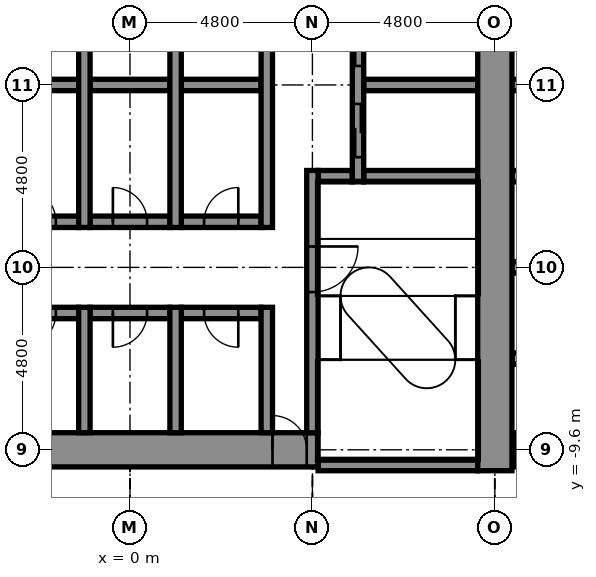
"""IFC4 building model, lengths in metres.
Left out: names, types, materials, properties, quantities, classifications, styles, units other than length and angle.
Written with IfcOpenShell. Run it as: python <this file> out.ifc"""

import sys

from ifc_helpers import new_model, si_unit, direction, frame, frame_2d, origin, place, context, subcontext, project, spatial, rectangle, extrude, element, fill, save


model = new_model("IFC4")
c1 = context("Model", 3, precision=1e-05, world=origin(), true_north=direction((0.0, 1.0)))
c2 = subcontext(c1, "Body", "Model", "MODEL_VIEW")
j1 = project(units=[si_unit("LENGTHUNIT", "METRE"), si_unit("PLANEANGLEUNIT", "RADIAN")], contexts=[c1])
p1 = place(None, origin())
s1 = spatial("IfcSite", under=j1, at=p1, CompositionType="ELEMENT")
p2 = place(p1, origin())
s2 = spatial("IfcBuilding", under=s1, at=p2, CompositionType="ELEMENT")
p3 = place(p2, frame((0.0, 0.0, 122.9)))
s3 = spatial("IfcBuildingStorey", under=s2, at=p3, CompositionType="ELEMENT", Elevation=122.9)
p4 = place(p3, frame((4.95, -10.0, -0.2), z_axis=(0.0, 0.0, 1.0), x_axis=(1.0, 0.0, 0.0)))
e1 = element("IfcWall", 1, at=p4, inside=s3, PredefinedType="STANDARD", context=c2, shape_type="SweptSolid", body=[
    extrude(rectangle(XDim=4.2, YDim=0.3, at=frame_2d((2.1, 0.0))), origin(), (0.0, 0.0, 1.0), 4.4),
])
p5 = place(p3, frame((-5.25, -9.6, -0.2), z_axis=(0.0, 0.0, 1.0), x_axis=(1.0, 0.0, 0.0)))
e2 = element("IfcWall", 2, at=p5, inside=s3, PredefinedType="SHEAR", context=c2, shape_type="SweptSolid", body=[
    extrude(rectangle(XDim=10.2, YDim=0.9, at=frame_2d((5.1, 0.0))), origin(), (0.0, 0.0, 1.0), 4.4),
])
p6 = place(p5, frame((9.0, 0.0, 0.2)))
e3 = element("IfcOpeningElement", 3, at=p6, cuts=e2, PredefinedType="OPENING", context=c2, shape_type="SweptSolid", body=[
    extrude(rectangle(XDim=0.9, YDim=2.1, at=frame_2d((0.45, 1.05))), frame((0.0, 0.46, 0.0), z_axis=(0.0, -1.0, 0.0), x_axis=(1.0, 0.0, 0.0)), (0.0, 0.0, 1.0), 0.92),
])
p7 = place(p3, frame((10.05, -9.6, -0.2), z_axis=(0.0, 0.0, 1.0), x_axis=(1.0, 0.0, 0.0)))
e4 = element("IfcWall", 4, at=p7, inside=s3, PredefinedType="SHEAR", context=c2, shape_type="SweptSolid", body=[
    extrude(rectangle(XDim=3.9, YDim=0.9, at=frame_2d((1.95, 0.0))), origin(), (0.0, 0.0, 1.0), 4.4),
])
p8 = place(p7, frame((0.1, 0.0, 0.2)))
e5 = element("IfcOpeningElement", 5, at=p8, cuts=e4, PredefinedType="OPENING", context=c2, shape_type="SweptSolid", body=[
    extrude(rectangle(XDim=0.9, YDim=2.1, at=frame_2d((0.45, 1.05))), frame((0.0, 0.46, 0.0), z_axis=(0.0, -1.0, 0.0), x_axis=(1.0, 0.0, 0.0)), (0.0, 0.0, 1.0), 0.92),
])
p9 = place(p7, frame((2.5, 0.0, 0.2)))
e6 = element("IfcOpeningElement", 6, at=p9, cuts=e4, PredefinedType="OPENING", context=c2, shape_type="SweptSolid", body=[
    extrude(rectangle(XDim=0.9, YDim=2.1, at=frame_2d((0.45, 1.05))), frame((0.0, 0.46, 0.0), z_axis=(0.0, -1.0, 0.0), x_axis=(1.0, 0.0, 0.0)), (0.0, 0.0, 1.0), 0.92),
])
p10 = place(p3, frame((10.05, -7.2, -0.2), z_axis=(0.0, 0.0, 1.0), x_axis=(1.0, 0.0, 0.0)))
e7 = element("IfcWall", 7, at=p10, inside=s3, PredefinedType="STANDARD", context=c2, shape_type="SweptSolid", body=[
    extrude(rectangle(XDim=3.9, YDim=0.3, at=frame_2d((1.95, 0.0))), origin(), (0.0, 0.0, 1.0), 4.4),
])
p11 = place(p3, frame((-3.45, -6.0, -0.2), z_axis=(0.0, 0.0, 1.0), x_axis=(1.0, 0.0, 0.0)))
e8 = element("IfcWall", 8, at=p11, inside=s3, PredefinedType="STANDARD", context=c2, shape_type="SweptSolid", body=[
    extrude(rectangle(XDim=2.1, YDim=0.3, at=frame_2d((1.05, 0.0))), origin(), (0.0, 0.0, 1.0), 4.4),
])
p12 = place(p11, frame((0.6, 0.0, 0.2)))
e9 = element("IfcOpeningElement", 9, at=p12, cuts=e8, PredefinedType="OPENING", context=c2, shape_type="SweptSolid", body=[
    extrude(rectangle(XDim=0.9, YDim=2.1, at=frame_2d((0.45, 1.05))), frame((0.0, 0.16, 0.0), z_axis=(0.0, -1.0, 0.0), x_axis=(1.0, 0.0, 0.0)), (0.0, 0.0, 1.0), 0.32),
])
p13 = place(p3, frame((-1.05, -6.0, -0.2), z_axis=(0.0, 0.0, 1.0), x_axis=(1.0, 0.0, 0.0)))
e10 = element("IfcWall", 10, at=p13, inside=s3, PredefinedType="STANDARD", context=c2, shape_type="SweptSolid", body=[
    extrude(rectangle(XDim=2.1, YDim=0.3, at=frame_2d((1.05, 0.0))), origin(), (0.0, 0.0, 1.0), 4.4),
])
p14 = place(p13, frame((0.6, 0.0, 0.2)))
e11 = element("IfcOpeningElement", 11, at=p14, cuts=e10, PredefinedType="OPENING", context=c2, shape_type="SweptSolid", body=[
    extrude(rectangle(XDim=0.9, YDim=2.1, at=frame_2d((0.45, 1.05))), frame((0.0, 0.16, 0.0), z_axis=(0.0, -1.0, 0.0), x_axis=(1.0, 0.0, 0.0)), (0.0, 0.0, 1.0), 0.32),
])
p15 = place(p3, frame((1.35, -6.0, -0.2), z_axis=(0.0, 0.0, 1.0), x_axis=(1.0, 0.0, 0.0)))
e12 = element("IfcWall", 12, at=p15, inside=s3, PredefinedType="STANDARD", context=c2, shape_type="SweptSolid", body=[
    extrude(rectangle(XDim=2.1, YDim=0.3, at=frame_2d((1.05, 0.0))), origin(), (0.0, 0.0, 1.0), 4.4),
])
p16 = place(p15, frame((0.6, 0.0, 0.2)))
e13 = element("IfcOpeningElement", 13, at=p16, cuts=e12, PredefinedType="OPENING", context=c2, shape_type="SweptSolid", body=[
    extrude(rectangle(XDim=0.9, YDim=2.1, at=frame_2d((0.45, 1.05))), frame((0.0, 0.16, 0.0), z_axis=(0.0, -1.0, 0.0), x_axis=(1.0, 0.0, 0.0)), (0.0, 0.0, 1.0), 0.32),
])
p17 = place(p3, frame((10.05, -4.8, -0.2), z_axis=(0.0, 0.0, 1.0), x_axis=(1.0, 0.0, 0.0)))
e14 = element("IfcWall", 14, at=p17, inside=s3, PredefinedType="STANDARD", context=c2, shape_type="SweptSolid", body=[
    extrude(rectangle(XDim=3.9, YDim=0.3, at=frame_2d((1.95, 0.0))), origin(), (0.0, 0.0, 1.0), 4.4),
])
p18 = place(p3, frame((-3.45, -3.6, -0.2), z_axis=(0.0, 0.0, 1.0), x_axis=(1.0, 0.0, 0.0)))
e15 = element("IfcWall", 15, at=p18, inside=s3, PredefinedType="STANDARD", context=c2, shape_type="SweptSolid", body=[
    extrude(rectangle(XDim=2.1, YDim=0.3, at=frame_2d((1.05, 0.0))), origin(), (0.0, 0.0, 1.0), 4.4),
])
p19 = place(p18, frame((0.6, 0.0, 0.2)))
e16 = element("IfcOpeningElement", 16, at=p19, cuts=e15, PredefinedType="OPENING", context=c2, shape_type="SweptSolid", body=[
    extrude(rectangle(XDim=0.9, YDim=2.1, at=frame_2d((0.45, 1.05))), frame((0.0, 0.16, 0.0), z_axis=(0.0, -1.0, 0.0), x_axis=(1.0, 0.0, 0.0)), (0.0, 0.0, 1.0), 0.32),
])
p20 = place(p3, frame((-1.05, -3.6, -0.2), z_axis=(0.0, 0.0, 1.0), x_axis=(1.0, 0.0, 0.0)))
e17 = element("IfcWall", 17, at=p20, inside=s3, PredefinedType="STANDARD", context=c2, shape_type="SweptSolid", body=[
    extrude(rectangle(XDim=2.1, YDim=0.3, at=frame_2d((1.05, 0.0))), origin(), (0.0, 0.0, 1.0), 4.4),
])
p21 = place(p20, frame((0.6, 0.0, 0.2)))
e18 = element("IfcOpeningElement", 18, at=p21, cuts=e17, PredefinedType="OPENING", context=c2, shape_type="SweptSolid", body=[
    extrude(rectangle(XDim=0.9, YDim=2.1, at=frame_2d((0.45, 1.05))), frame((0.0, 0.16, 0.0), z_axis=(0.0, -1.0, 0.0), x_axis=(1.0, 0.0, 0.0)), (0.0, 0.0, 1.0), 0.32),
])
p22 = place(p3, frame((1.35, -3.6, -0.2), z_axis=(0.0, 0.0, 1.0), x_axis=(1.0, 0.0, 0.0)))
e19 = element("IfcWall", 19, at=p22, inside=s3, PredefinedType="STANDARD", context=c2, shape_type="SweptSolid", body=[
    extrude(rectangle(XDim=2.1, YDim=0.3, at=frame_2d((1.05, 0.0))), origin(), (0.0, 0.0, 1.0), 4.4),
])
p23 = place(p22, frame((0.6, 0.0, 0.2)))
e20 = element("IfcOpeningElement", 20, at=p23, cuts=e19, PredefinedType="OPENING", context=c2, shape_type="SweptSolid", body=[
    extrude(rectangle(XDim=0.9, YDim=2.1, at=frame_2d((0.45, 1.05))), frame((0.0, 0.16, 0.0), z_axis=(0.0, -1.0, 0.0), x_axis=(1.0, 0.0, 0.0)), (0.0, 0.0, 1.0), 0.32),
])
p24 = place(p3, frame((4.95, -2.4, -0.2), z_axis=(0.0, 0.0, 1.0), x_axis=(1.0, 0.0, 0.0)))
e21 = element("IfcWall", 21, at=p24, inside=s3, PredefinedType="STANDARD", context=c2, shape_type="SweptSolid", body=[
    extrude(rectangle(XDim=0.9, YDim=0.3, at=frame_2d((0.45, 0.0))), origin(), (0.0, 0.0, 1.0), 4.4),
])
p25 = place(p3, frame((6.15, -2.4, -0.2), z_axis=(0.0, 0.0, 1.0), x_axis=(1.0, 0.0, 0.0)))
e22 = element("IfcWall", 22, at=p25, inside=s3, PredefinedType="STANDARD", context=c2, shape_type="SweptSolid", body=[
    extrude(rectangle(XDim=3.0, YDim=0.3, at=frame_2d((1.5, 0.0))), origin(), (0.0, 0.0, 1.0), 4.4),
])
p26 = place(p3, frame((10.05, -2.4, -0.2), z_axis=(0.0, 0.0, 1.0), x_axis=(1.0, 0.0, 0.0)))
e23 = element("IfcWall", 23, at=p26, inside=s3, PredefinedType="STANDARD", context=c2, shape_type="SweptSolid", body=[
    extrude(rectangle(XDim=3.9, YDim=0.3, at=frame_2d((1.95, 0.0))), origin(), (0.0, 0.0, 1.0), 4.4),
])
p27 = place(p3, frame((-3.45, 0.0, -0.2), z_axis=(0.0, 0.0, 1.0), x_axis=(1.0, 0.0, 0.0)))
e24 = element("IfcWall", 24, at=p27, inside=s3, PredefinedType="STANDARD", context=c2, shape_type="SweptSolid", body=[
    extrude(rectangle(XDim=2.1, YDim=0.3, at=frame_2d((1.05, 0.0))), origin(), (0.0, 0.0, 1.0), 4.4),
])
p28 = place(p3, frame((-1.05, 0.0, -0.2), z_axis=(0.0, 0.0, 1.0), x_axis=(1.0, 0.0, 0.0)))
e25 = element("IfcWall", 25, at=p28, inside=s3, PredefinedType="STANDARD", context=c2, shape_type="SweptSolid", body=[
    extrude(rectangle(XDim=2.1, YDim=0.3, at=frame_2d((1.05, 0.0))), origin(), (0.0, 0.0, 1.0), 4.4),
])
p29 = place(p3, frame((1.35, 0.0, -0.2), z_axis=(0.0, 0.0, 1.0), x_axis=(1.0, 0.0, 0.0)))
e26 = element("IfcWall", 26, at=p29, inside=s3, PredefinedType="STANDARD", context=c2, shape_type="SweptSolid", body=[
    extrude(rectangle(XDim=2.1, YDim=0.3, at=frame_2d((1.05, 0.0))), origin(), (0.0, 0.0, 1.0), 4.4),
])
p30 = place(p3, frame((6.15, 0.0, -0.2), z_axis=(0.0, 0.0, 1.0), x_axis=(1.0, 0.0, 0.0)))
e27 = element("IfcWall", 27, at=p30, inside=s3, PredefinedType="STANDARD", context=c2, shape_type="SweptSolid", body=[
    extrude(rectangle(XDim=3.0, YDim=0.3, at=frame_2d((1.5, 0.0))), origin(), (0.0, 0.0, 1.0), 4.4),
])
p31 = place(p3, frame((10.05, 0.0, -0.2), z_axis=(0.0, 0.0, 1.0), x_axis=(1.0, 0.0, 0.0)))
e28 = element("IfcWall", 28, at=p31, inside=s3, PredefinedType="STANDARD", context=c2, shape_type="SweptSolid", body=[
    extrude(rectangle(XDim=3.9, YDim=0.3, at=frame_2d((1.95, 0.0))), origin(), (0.0, 0.0, 1.0), 4.4),
])
p32 = place(p3, frame((-1.2, -9.15, -0.2), z_axis=(0.0, 0.0, 1.0), x_axis=(0.0, 1.0, 0.0)))
e29 = element("IfcWall", 29, at=p32, inside=s3, PredefinedType="STANDARD", context=c2, shape_type="SweptSolid", body=[
    extrude(rectangle(XDim=3.3, YDim=0.3, at=frame_2d((1.65, 0.0))), origin(), (0.0, 0.0, 1.0), 4.4),
])
p33 = place(p3, frame((-1.2, -3.75, -0.2), z_axis=(0.0, 0.0, 1.0), x_axis=(0.0, 1.0, 0.0)))
e30 = element("IfcWall", 30, at=p33, inside=s3, PredefinedType="STANDARD", context=c2, shape_type="SweptSolid", body=[
    extrude(rectangle(XDim=7.5, YDim=0.3, at=frame_2d((3.75, 0.0))), origin(), (0.0, 0.0, 1.0), 4.4),
])
p34 = place(p3, frame((1.2, -9.15, -0.2), z_axis=(0.0, 0.0, 1.0), x_axis=(0.0, 1.0, 0.0)))
e31 = element("IfcWall", 31, at=p34, inside=s3, PredefinedType="STANDARD", context=c2, shape_type="SweptSolid", body=[
    extrude(rectangle(XDim=3.3, YDim=0.3, at=frame_2d((1.65, 0.0))), origin(), (0.0, 0.0, 1.0), 4.4),
])
p35 = place(p3, frame((1.2, -3.75, -0.2), z_axis=(0.0, 0.0, 1.0), x_axis=(0.0, 1.0, 0.0)))
e32 = element("IfcWall", 32, at=p35, inside=s3, PredefinedType="STANDARD", context=c2, shape_type="SweptSolid", body=[
    extrude(rectangle(XDim=7.5, YDim=0.3, at=frame_2d((3.75, 0.0))), origin(), (0.0, 0.0, 1.0), 4.4),
])
p36 = place(p3, frame((3.6, -9.15, -0.2), z_axis=(0.0, 0.0, 1.0), x_axis=(0.0, 1.0, 0.0)))
e33 = element("IfcWall", 33, at=p36, inside=s3, PredefinedType="STANDARD", context=c2, shape_type="SweptSolid", body=[
    extrude(rectangle(XDim=3.3, YDim=0.3, at=frame_2d((1.65, 0.0))), origin(), (0.0, 0.0, 1.0), 4.4),
])
p37 = place(p3, frame((3.6, -3.75, -0.2), z_axis=(0.0, 0.0, 1.0), x_axis=(0.0, 1.0, 0.0)))
e34 = element("IfcWall", 34, at=p37, inside=s3, PredefinedType="STANDARD", context=c2, shape_type="SweptSolid", body=[
    extrude(rectangle(XDim=7.5, YDim=0.3, at=frame_2d((3.75, 0.0))), origin(), (0.0, 0.0, 1.0), 4.4),
])
p38 = place(p3, frame((4.8, -9.15, -0.2), z_axis=(0.0, 0.0, 1.0), x_axis=(0.0, 1.0, 0.0)))
e35 = element("IfcWall", 35, at=p38, inside=s3, PredefinedType="STANDARD", context=c2, shape_type="SweptSolid", body=[
    extrude(rectangle(XDim=6.9, YDim=0.3, at=frame_2d((3.45, 0.0))), origin(), (0.0, 0.0, 1.0), 4.4),
])
p39 = place(p38, frame((3.7, 0.0, 0.2)))
e36 = element("IfcOpeningElement", 36, at=p39, cuts=e35, PredefinedType="OPENING", context=c2, shape_type="SweptSolid", body=[
    extrude(rectangle(XDim=1.2, YDim=2.1, at=frame_2d((0.6, 1.05))), frame((0.0, 0.16, 0.0), z_axis=(0.0, -1.0, 0.0), x_axis=(1.0, 0.0, 0.0)), (0.0, 0.0, 1.0), 0.32),
])
p40 = place(p3, frame((6.0, -2.55, -0.2), z_axis=(0.0, 0.0, 1.0), x_axis=(0.0, 1.0, 0.0)))
e37 = element("IfcWall", 37, at=p40, inside=s3, PredefinedType="STANDARD", context=c2, shape_type="SweptSolid", body=[
    extrude(rectangle(XDim=7.5, YDim=0.3, at=frame_2d((3.75, 0.0))), origin(), (0.0, 0.0, 1.0), 4.4),
])
p41 = place(p40, frame((0.65, 0.0, 0.2)))
e38 = element("IfcOpeningElement", 38, at=p41, cuts=e37, PredefinedType="OPENING", context=c2, shape_type="SweptSolid", body=[
    extrude(rectangle(XDim=1.4, YDim=2.1, at=frame_2d((0.7, 1.05))), frame((0.0, 0.16, 0.0), z_axis=(0.0, -1.0, 0.0), x_axis=(1.0, 0.0, 0.0)), (0.0, 0.0, 1.0), 0.32),
])
p42 = place(p40, frame((3.05, 0.0, 0.2)))
e39 = element("IfcOpeningElement", 39, at=p42, cuts=e37, PredefinedType="OPENING", context=c2, shape_type="SweptSolid", body=[
    extrude(rectangle(XDim=1.4, YDim=2.1, at=frame_2d((0.7, 1.05))), frame((0.0, 0.16, 0.0), z_axis=(0.0, -1.0, 0.0), x_axis=(1.0, 0.0, 0.0)), (0.0, 0.0, 1.0), 0.32),
])
p43 = place(p40, frame((5.45, 0.0, 0.2)))
e40 = element("IfcOpeningElement", 40, at=p43, cuts=e37, PredefinedType="OPENING", context=c2, shape_type="SweptSolid", body=[
    extrude(rectangle(XDim=1.4, YDim=2.1, at=frame_2d((0.7, 1.05))), frame((0.0, 0.16, 0.0), z_axis=(0.0, -1.0, 0.0), x_axis=(1.0, 0.0, 0.0)), (0.0, 0.0, 1.0), 0.32),
])
p44 = place(p3, frame((9.6, -10.15, -0.2), z_axis=(0.0, 0.0, 1.0), x_axis=(0.0, 1.0, 0.0)))
e41 = element("IfcWall", 41, at=p44, inside=s3, PredefinedType="SHEAR", context=c2, shape_type="SweptSolid", body=[
    extrude(rectangle(XDim=20.2, YDim=0.9, at=frame_2d((10.1, 0.0))), origin(), (0.0, 0.0, 1.0), 4.4),
])
p45 = place(p41, origin())
e42 = element("IfcDoor", 42, at=p45, inside=s3, OperationType="DOUBLE_DOOR_SLIDING", PredefinedType="DOOR", context=c2, shape_type="SweptSolid", body=[
    extrude(rectangle(XDim=1.4, YDim=2.1, at=frame_2d((0.7, 1.05))), frame((0.0, 0.025, 0.0), z_axis=(0.0, -1.0, 0.0), x_axis=(1.0, 0.0, 0.0)), (0.0, 0.0, 1.0), 0.05),
])
fill(e38, e42)
p46 = place(p42, origin())
e43 = element("IfcDoor", 43, at=p46, inside=s3, OperationType="DOUBLE_DOOR_SLIDING", PredefinedType="DOOR", context=c2, shape_type="SweptSolid", body=[
    extrude(rectangle(XDim=1.4, YDim=2.1, at=frame_2d((0.7, 1.05))), frame((0.0, 0.025, 0.0), z_axis=(0.0, -1.0, 0.0), x_axis=(1.0, 0.0, 0.0)), (0.0, 0.0, 1.0), 0.05),
])
fill(e39, e43)
p47 = place(p39, frame((1.2, 0.0, 0.0), z_axis=(0.0, 0.0, 1.0), x_axis=(-1.0, 0.0, 0.0)))
e44 = element("IfcDoor", 44, at=p47, inside=s3, OperationType="SINGLE_SWING_RIGHT", PredefinedType="DOOR", context=c2, shape_type="SweptSolid", body=[
    extrude(rectangle(XDim=1.2, YDim=2.1, at=frame_2d((0.6, 1.05))), frame((0.0, 0.025, 0.0), z_axis=(0.0, -1.0, 0.0), x_axis=(1.0, 0.0, 0.0)), (0.0, 0.0, 1.0), 0.05),
])
fill(e36, e44)
p48 = place(p19, origin())
e45 = element("IfcDoor", 45, at=p48, inside=s3, OperationType="SINGLE_SWING_LEFT", PredefinedType="DOOR", context=c2, shape_type="SweptSolid", body=[
    extrude(rectangle(XDim=0.9, YDim=2.1, at=frame_2d((0.45, 1.05))), frame((0.0, 0.025, 0.0), z_axis=(0.0, -1.0, 0.0), x_axis=(1.0, 0.0, 0.0)), (0.0, 0.0, 1.0), 0.05),
])
fill(e16, e45)
p49 = place(p21, origin())
e46 = element("IfcDoor", 46, at=p49, inside=s3, OperationType="SINGLE_SWING_LEFT", PredefinedType="DOOR", context=c2, shape_type="SweptSolid", body=[
    extrude(rectangle(XDim=0.9, YDim=2.1, at=frame_2d((0.45, 1.05))), frame((0.0, 0.025, 0.0), z_axis=(0.0, -1.0, 0.0), x_axis=(1.0, 0.0, 0.0)), (0.0, 0.0, 1.0), 0.05),
])
fill(e18, e46)
p50 = place(p23, origin())
e47 = element("IfcDoor", 47, at=p50, inside=s3, OperationType="SINGLE_SWING_RIGHT", PredefinedType="DOOR", context=c2, shape_type="SweptSolid", body=[
    extrude(rectangle(XDim=0.9, YDim=2.1, at=frame_2d((0.45, 1.05))), frame((0.0, 0.025, 0.0), z_axis=(0.0, -1.0, 0.0), x_axis=(1.0, 0.0, 0.0)), (0.0, 0.0, 1.0), 0.05),
])
fill(e20, e47)
p51 = place(p12, frame((0.9, 0.0, 0.0), z_axis=(0.0, 0.0, 1.0), x_axis=(-1.0, 0.0, 0.0)))
e48 = element("IfcDoor", 48, at=p51, inside=s3, OperationType="SINGLE_SWING_LEFT", PredefinedType="DOOR", context=c2, shape_type="SweptSolid", body=[
    extrude(rectangle(XDim=0.9, YDim=2.1, at=frame_2d((0.45, 1.05))), frame((0.0, 0.025, 0.0), z_axis=(0.0, -1.0, 0.0), x_axis=(1.0, 0.0, 0.0)), (0.0, 0.0, 1.0), 0.05),
])
fill(e9, e48)
p52 = place(p14, frame((0.9, 0.0, 0.0), z_axis=(0.0, 0.0, 1.0), x_axis=(-1.0, 0.0, 0.0)))
e49 = element("IfcDoor", 49, at=p52, inside=s3, OperationType="SINGLE_SWING_LEFT", PredefinedType="DOOR", context=c2, shape_type="SweptSolid", body=[
    extrude(rectangle(XDim=0.9, YDim=2.1, at=frame_2d((0.45, 1.05))), frame((0.0, 0.025, 0.0), z_axis=(0.0, -1.0, 0.0), x_axis=(1.0, 0.0, 0.0)), (0.0, 0.0, 1.0), 0.05),
])
fill(e11, e49)
p53 = place(p16, frame((0.9, 0.0, 0.0), z_axis=(0.0, 0.0, 1.0), x_axis=(-1.0, 0.0, 0.0)))
e50 = element("IfcDoor", 50, at=p53, inside=s3, OperationType="SINGLE_SWING_RIGHT", PredefinedType="DOOR", context=c2, shape_type="SweptSolid", body=[
    extrude(rectangle(XDim=0.9, YDim=2.1, at=frame_2d((0.45, 1.05))), frame((0.0, 0.025, 0.0), z_axis=(0.0, -1.0, 0.0), x_axis=(1.0, 0.0, 0.0)), (0.0, 0.0, 1.0), 0.05),
])
fill(e13, e50)
p54 = place(p6, origin())
e51 = element("IfcDoor", 51, at=p54, inside=s3, OperationType="SINGLE_SWING_LEFT", PredefinedType="DOOR", context=c2, shape_type="SweptSolid", body=[
    extrude(rectangle(XDim=0.9, YDim=2.1, at=frame_2d((0.45, 1.05))), frame((0.0, 0.025, 0.0), z_axis=(0.0, -1.0, 0.0), x_axis=(1.0, 0.0, 0.0)), (0.0, 0.0, 1.0), 0.05),
])
fill(e3, e51)
save(model, sys.argv[1])
